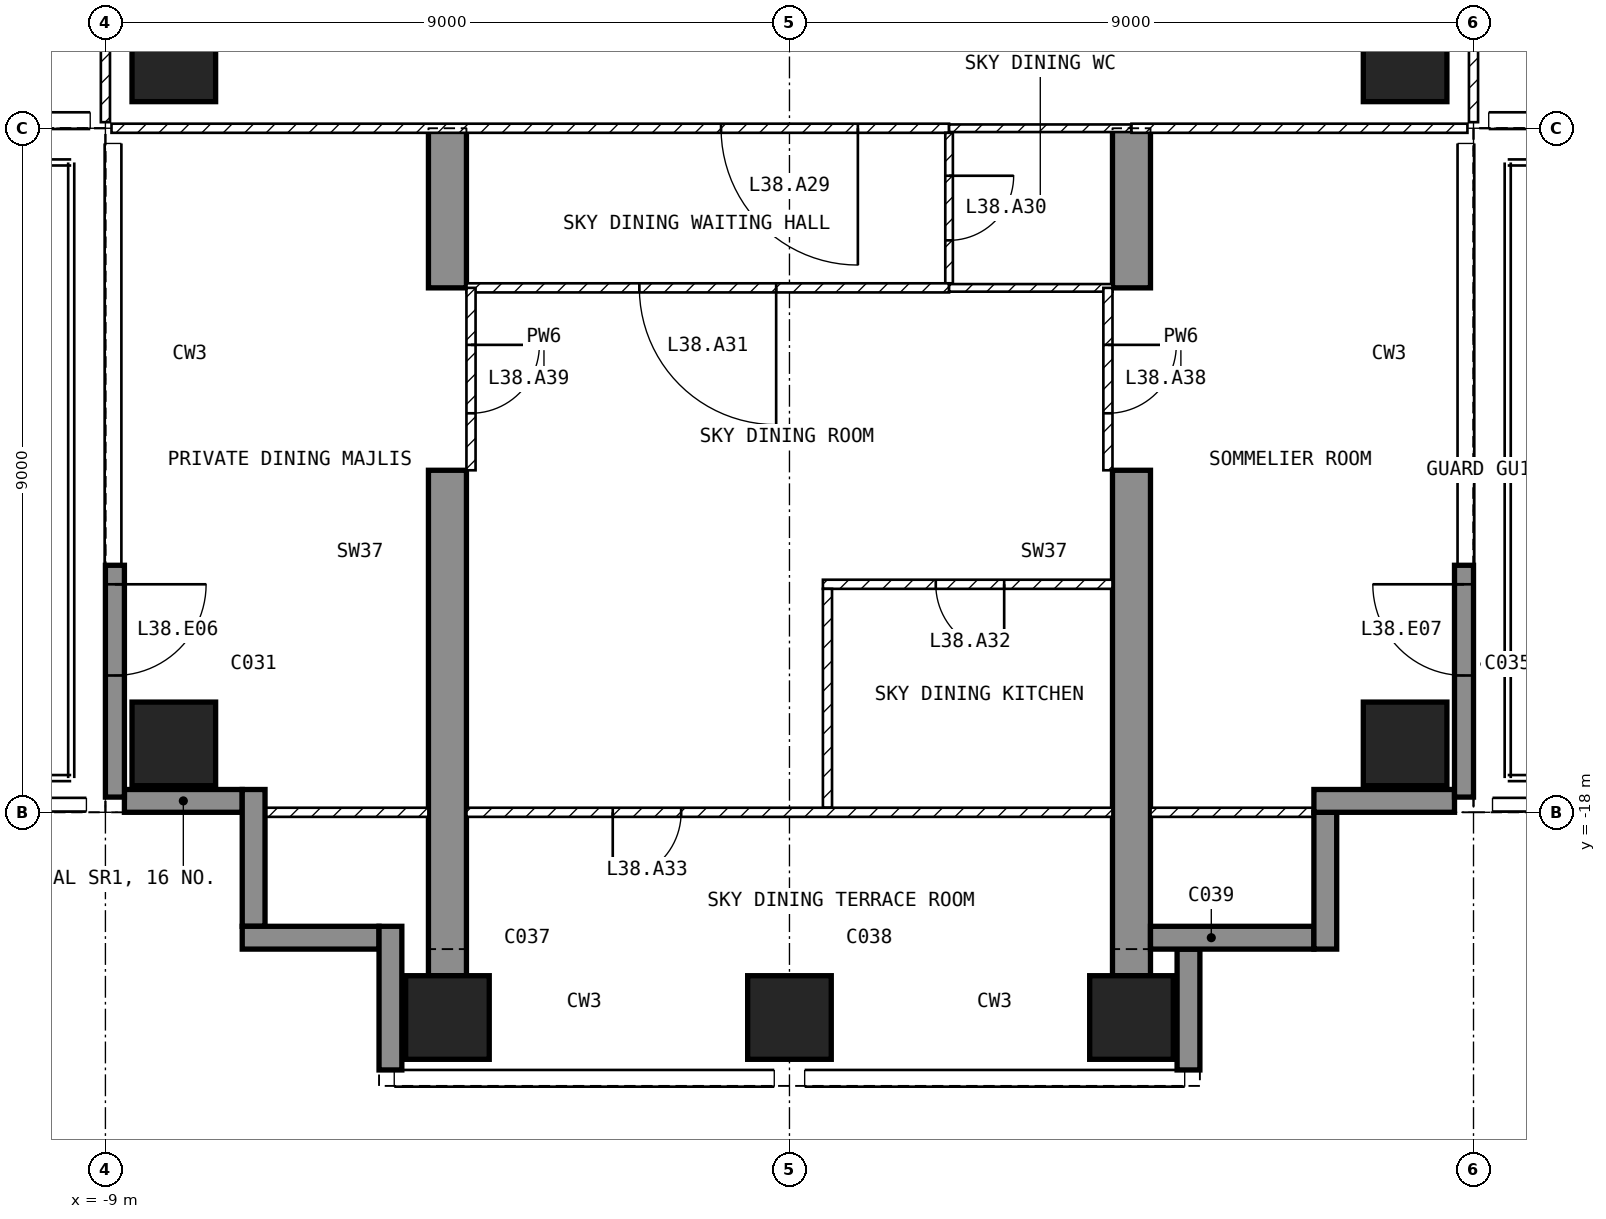
"""IFC4 building model, lengths in metres.
Left out: names, types, materials, properties, quantities, classifications, styles, units other than length and angle.
Written with IfcOpenShell. Run it as: python <this file> out.ifc"""

import sys

from ifc_helpers import new_model, si_unit, direction, frame, frame_2d, origin, origin_2d, place, context, subcontext, project, spatial, polyline, rectangle, outline, extrude, element, fill, save


model = new_model("IFC4")
c1 = context("Model", 3, precision=1e-05, world=origin(), true_north=direction((0.0, 1.0)))
c2 = subcontext(c1, "Body", "Model", "MODEL_VIEW")
j1 = project(units=[si_unit("LENGTHUNIT", "METRE"), si_unit("PLANEANGLEUNIT", "RADIAN")], contexts=[c1])
p1 = place(None, origin())
s1 = spatial("IfcSite", under=j1, at=p1, CompositionType="ELEMENT")
p2 = place(p1, origin())
s2 = spatial("IfcBuilding", under=s1, at=p2, CompositionType="ELEMENT")
p3 = place(p2, frame((0.0, 0.0, 154.9)))
s3 = spatial("IfcBuildingStorey", under=s2, at=p3, CompositionType="ELEMENT", Elevation=154.9)
for number, where, z_axis, x_axis in (
    (1, (-8.1, -17.1, -0.3), (0.0, 0.0, 1.0), (1.0, 0.0, 0.0)),
    (2, (-8.1, -8.1, -0.3), (0.0, 0.0, 1.0), (1.0, 0.0, 0.0)),
    (3, (-4.5, -20.7, -0.3), (0.0, 0.0, 1.0), (1.0, 0.0, 0.0)),
    (4, (0.0, -20.7, -0.3), (0.0, 0.0, 1.0), (1.0, 0.0, 0.0)),
    (5, (4.5, -20.7, -0.3), (0.0, 0.0, 1.0), (1.0, 0.0, 0.0)),
    (6, (8.1, -17.1, -0.3), (0.0, 0.0, 1.0), (1.0, 0.0, 0.0)),
    (7, (8.1, -8.1, -0.3), (0.0, 0.0, 1.0), (1.0, 0.0, 0.0)),
):
    element("IfcColumn", number, at=place(p3, frame(where, z_axis=z_axis, x_axis=x_axis)), inside=s3, PredefinedType="COLUMN", context=c2, shape_type="SweptSolid", body=[
        extrude(rectangle(XDim=1.1, YDim=1.1, at=origin_2d()), origin(), (0.0, 0.0, 1.0), 7.05),
    ])
for number, where, z_axis, x_axis in (
    (8, (-4.75, -20.15, -0.3), (1.0, 0.0, 0.0), (0.0, 1.0, 0.0)),
    (9, (4.25, -20.15, -0.3), (1.0, 0.0, 0.0), (0.0, 1.0, 0.0)),
):
    element("IfcWall", number, at=place(p3, frame(where, z_axis=z_axis, x_axis=x_axis)), inside=s3, PredefinedType="SHEAR", context=c2, shape_type="SweptSolid", body=[
        extrude(outline(polyline([(0.0, 0.0), (6.65, 0.0), (6.65, 2.7), (9.05, 2.7), (9.05, 0.0), (11.15, 0.0), (11.15, 7.05), (0.0, 7.05), (0.0, 0.0)])), origin(), (0.0, 0.0, 1.0), 0.5),
    ])
p4 = place(p3, frame((-8.875, -14.75, 0.0), z_axis=(0.0, 0.0, 1.0), x_axis=(0.0, -1.0, 0.0)))
e10 = element("IfcWall", 10, at=p4, inside=s3, PredefinedType="SOLIDWALL", context=c2, shape_type="SweptSolid", body=[
    extrude(rectangle(XDim=3.05, YDim=0.25, at=frame_2d((1.525, 0.0))), origin(), (0.0, 0.0, 1.0), 6.75),
])
p5 = place(p4, frame((0.25, 0.0, 0.0)))
e11 = element("IfcOpeningElement", 11, at=p5, cuts=e10, PredefinedType="OPENING", context=c2, shape_type="SweptSolid", body=[
    extrude(rectangle(XDim=1.2, YDim=2.4, at=frame_2d((0.6, 1.2))), frame((0.0, 0.135, 0.0), z_axis=(0.0, -1.0, 0.0), x_axis=(1.0, 0.0, 0.0)), (0.0, 0.0, 1.0), 0.27),
])
p6 = place(p3, frame((8.875, -17.8, 0.0), z_axis=(0.0, 0.0, 1.0), x_axis=(0.0, 1.0, 0.0)))
e12 = element("IfcWall", 12, at=p6, inside=s3, PredefinedType="SOLIDWALL", context=c2, shape_type="SweptSolid", body=[
    extrude(rectangle(XDim=3.05, YDim=0.25, at=frame_2d((1.525, 0.0))), origin(), (0.0, 0.0, 1.0), 6.75),
])
p7 = place(p6, frame((1.6, 0.0, 0.0)))
e13 = element("IfcOpeningElement", 13, at=p7, cuts=e12, PredefinedType="OPENING", context=c2, shape_type="SweptSolid", body=[
    extrude(rectangle(XDim=1.2, YDim=2.4, at=frame_2d((0.6, 1.2))), frame((0.0, 0.135, 0.0), z_axis=(0.0, -1.0, 0.0), x_axis=(1.0, 0.0, 0.0)), (0.0, 0.0, 1.0), 0.27),
])
p8 = place(p3, frame((5.25, -21.39, 0.0), z_axis=(0.0, 0.0, 1.0), x_axis=(0.0, 1.0, 0.0)))
e14 = element("IfcWall", 14, at=p8, inside=s3, PredefinedType="SOLIDWALL", context=c2, shape_type="SweptSolid", body=[
    extrude(rectangle(XDim=1.59, YDim=0.3, at=frame_2d((0.795, 0.0))), origin(), (0.0, 0.0, 1.0), 6.75),
])
p9 = place(p3, frame((4.75, -19.65, 0.0), z_axis=(0.0, 0.0, 1.0), x_axis=(1.0, 0.0, 0.0)))
e15 = element("IfcWall", 15, at=p9, inside=s3, PredefinedType="SOLIDWALL", context=c2, shape_type="SweptSolid", body=[
    extrude(rectangle(XDim=2.15, YDim=0.3, at=frame_2d((1.075, 0.0))), origin(), (0.0, 0.0, 1.0), 6.75),
])
p10 = place(p3, frame((7.05, -19.8, 0.0), z_axis=(0.0, 0.0, 1.0), x_axis=(0.0, 1.0, 0.0)))
e16 = element("IfcWall", 16, at=p10, inside=s3, PredefinedType="SOLIDWALL", context=c2, shape_type="SweptSolid", body=[
    extrude(rectangle(XDim=1.8, YDim=0.3, at=frame_2d((0.9, 0.0))), origin(), (0.0, 0.0, 1.0), 6.75),
])
p11 = place(p3, frame((6.9, -17.85, 0.0), z_axis=(0.0, 0.0, 1.0), x_axis=(1.0, 0.0, 0.0)))
e17 = element("IfcWall", 17, at=p11, inside=s3, PredefinedType="SOLIDWALL", context=c2, shape_type="SweptSolid", body=[
    extrude(rectangle(XDim=1.85, YDim=0.3, at=frame_2d((0.925, 0.0))), origin(), (0.0, 0.0, 1.0), 6.75),
])
p12 = place(p3, frame((-8.75, -17.85, 0.0), z_axis=(0.0, 0.0, 1.0), x_axis=(1.0, 0.0, 0.0)))
e18 = element("IfcWall", 18, at=p12, inside=s3, PredefinedType="SOLIDWALL", context=c2, shape_type="SweptSolid", body=[
    extrude(rectangle(XDim=1.55, YDim=0.3, at=frame_2d((0.775, 0.0))), origin(), (0.0, 0.0, 1.0), 6.75),
])
for number, where, z_axis, x_axis in (
    (19, (-7.05, -17.7, 0.0), (0.0, 0.0, 1.0), (0.0, -1.0, 0.0)),
    (20, (-7.2, -19.65, 0.0), (0.0, 0.0, 1.0), (1.0, 0.0, 0.0)),
):
    element("IfcWall", number, at=place(p3, frame(where, z_axis=z_axis, x_axis=x_axis)), inside=s3, PredefinedType="SOLIDWALL", context=c2, shape_type="SweptSolid", body=[
        extrude(rectangle(XDim=1.8, YDim=0.3, at=frame_2d((0.9, 0.0))), origin(), (0.0, 0.0, 1.0), 6.75),
    ])
p13 = place(p3, frame((-5.25, -19.5, 0.0), z_axis=(0.0, 0.0, 1.0), x_axis=(0.0, -1.0, 0.0)))
e21 = element("IfcWall", 21, at=p13, inside=s3, PredefinedType="SOLIDWALL", context=c2, shape_type="SweptSolid", body=[
    extrude(rectangle(XDim=1.89, YDim=0.3, at=frame_2d((0.945, 0.0))), origin(), (0.0, 0.0, 1.0), 6.75),
])
for number, where, z_axis, x_axis in (
    (22, (9.0, -1.26, 0.0), (0.0, 0.0, 1.0), (0.0, -1.0, 0.0)),
    (23, (-9.0, -8.92, 0.0), (0.0, 0.0, 1.0), (0.0, 1.0, 0.0)),
):
    element("IfcWall", number, at=place(p3, frame(where, z_axis=z_axis, x_axis=x_axis)), inside=s3, PredefinedType="PARTITIONING", context=c2, shape_type="SweptSolid", body=[
        extrude(rectangle(XDim=7.66, YDim=0.12, at=frame_2d((3.83, 0.0))), origin(), (0.0, 0.0, 1.0), 6.75),
    ])
p14 = place(p3, frame((2.1, -9.0, 0.0), z_axis=(0.0, 0.0, 1.0), x_axis=(-1.0, 0.0, 0.0)))
e24 = element("IfcWall", 24, at=p14, inside=s3, PredefinedType="PARTITIONING", context=c2, shape_type="SweptSolid", body=[
    extrude(rectangle(XDim=11.02, YDim=0.12, at=frame_2d((5.51, 0.0))), origin(), (0.0, 0.0, 1.0), 6.75),
])
p15 = place(p14, frame((1.2, 0.0, 0.0)))
e25 = element("IfcOpeningElement", 25, at=p15, cuts=e24, PredefinedType="OPENING", context=c2, shape_type="SweptSolid", body=[
    extrude(rectangle(XDim=1.8, YDim=2.1, at=frame_2d((0.9, 1.05))), frame((0.0, 0.07, 0.0), z_axis=(0.0, -1.0, 0.0), x_axis=(1.0, 0.0, 0.0)), (0.0, 0.0, 1.0), 0.14),
])
p16 = place(p3, frame((4.5, -9.0, 0.0), z_axis=(0.0, 0.0, 1.0), x_axis=(-1.0, 0.0, 0.0)))
e26 = element("IfcWall", 26, at=p16, inside=s3, PredefinedType="PARTITIONING", context=c2, shape_type="SweptSolid", body=[
    extrude(rectangle(XDim=2.4, YDim=0.1, at=frame_2d((1.2, 0.0))), origin(), (0.0, 0.0, 1.0), 6.75),
])
p17 = place(p3, frame((8.92, -9.0, 0.0), z_axis=(0.0, 0.0, 1.0), x_axis=(-1.0, 0.0, 0.0)))
e27 = element("IfcWall", 27, at=p17, inside=s3, PredefinedType="PARTITIONING", context=c2, shape_type="SweptSolid", body=[
    extrude(rectangle(XDim=4.42, YDim=0.12, at=frame_2d((2.21, 0.0))), origin(), (0.0, 0.0, 1.0), 6.75),
])
p18 = place(p3, frame((2.1, -9.06, 0.0), z_axis=(0.0, 0.0, 1.0), x_axis=(0.0, -1.0, 0.0)))
e28 = element("IfcWall", 28, at=p18, inside=s3, PredefinedType="PARTITIONING", context=c2, shape_type="SweptSolid", body=[
    extrude(rectangle(XDim=1.98, YDim=0.1, at=frame_2d((0.99, 0.0))), origin(), (0.0, 0.0, 1.0), 6.75),
])
p19 = place(p18, frame((0.565, 0.0, 0.0)))
e29 = element("IfcOpeningElement", 29, at=p19, cuts=e28, PredefinedType="OPENING", context=c2, shape_type="SweptSolid", body=[
    extrude(rectangle(XDim=0.85, YDim=2.1, at=frame_2d((0.425, 1.05))), frame((0.0, 0.06, 0.0), z_axis=(0.0, -1.0, 0.0), x_axis=(1.0, 0.0, 0.0)), (0.0, 0.0, 1.0), 0.12),
])
p20 = place(p3, frame((2.1, -11.1, 0.0), z_axis=(0.0, 0.0, 1.0), x_axis=(-1.0, 0.0, 0.0)))
e30 = element("IfcWall", 30, at=p20, inside=s3, PredefinedType="PARTITIONING", context=c2, shape_type="SweptSolid", body=[
    extrude(rectangle(XDim=6.35, YDim=0.12, at=frame_2d((3.175, 0.0))), origin(), (0.0, 0.0, 1.0), 6.75),
])
p21 = place(p20, frame((2.275, 0.0, 0.0)))
e31 = element("IfcOpeningElement", 31, at=p21, cuts=e30, PredefinedType="OPENING", context=c2, shape_type="SweptSolid", body=[
    extrude(rectangle(XDim=1.8, YDim=2.1, at=frame_2d((0.9, 1.05))), frame((0.0, 0.07, 0.0), z_axis=(0.0, -1.0, 0.0), x_axis=(1.0, 0.0, 0.0)), (0.0, 0.0, 1.0), 0.14),
])
p22 = place(p3, frame((4.25, -11.1, 0.0), z_axis=(0.0, 0.0, 1.0), x_axis=(-1.0, 0.0, 0.0)))
e32 = element("IfcWall", 32, at=p22, inside=s3, PredefinedType="PARTITIONING", context=c2, shape_type="SweptSolid", body=[
    extrude(rectangle(XDim=2.15, YDim=0.1, at=frame_2d((1.075, 0.0))), origin(), (0.0, 0.0, 1.0), 6.75),
])
p23 = place(p3, frame((4.25, -15.0, 0.0), z_axis=(0.0, 0.0, 1.0), x_axis=(-1.0, 0.0, 0.0)))
e33 = element("IfcWall", 33, at=p23, inside=s3, PredefinedType="PARTITIONING", context=c2, shape_type="SweptSolid", body=[
    extrude(rectangle(XDim=3.81, YDim=0.12, at=frame_2d((1.905, 0.0))), origin(), (0.0, 0.0, 1.0), 6.75),
])
p24 = place(p23, frame((1.425, 0.0, 0.0)))
e34 = element("IfcOpeningElement", 34, at=p24, cuts=e33, PredefinedType="OPENING", context=c2, shape_type="SweptSolid", body=[
    extrude(rectangle(XDim=0.9, YDim=2.1, at=frame_2d((0.45, 1.05))), frame((0.0, 0.07, 0.0), z_axis=(0.0, -1.0, 0.0), x_axis=(1.0, 0.0, 0.0)), (0.0, 0.0, 1.0), 0.14),
])
p25 = place(p3, frame((0.5, -15.06, 0.0), z_axis=(0.0, 0.0, 1.0), x_axis=(0.0, -1.0, 0.0)))
e35 = element("IfcWall", 35, at=p25, inside=s3, PredefinedType="PARTITIONING", context=c2, shape_type="SweptSolid", body=[
    extrude(rectangle(XDim=2.88, YDim=0.12, at=frame_2d((1.44, 0.0))), origin(), (0.0, 0.0, 1.0), 6.75),
])
p26 = place(p3, frame((4.25, -18.0, 0.0), z_axis=(0.0, 0.0, 1.0), x_axis=(-1.0, 0.0, 0.0)))
e36 = element("IfcWall", 36, at=p26, inside=s3, PredefinedType="PARTITIONING", context=c2, shape_type="SweptSolid", body=[
    extrude(rectangle(XDim=8.5, YDim=0.12, at=frame_2d((4.25, 0.0))), origin(), (0.0, 0.0, 1.0), 6.75),
])
p27 = place(p26, frame((5.675, 0.0, 0.0)))
e37 = element("IfcOpeningElement", 37, at=p27, cuts=e36, PredefinedType="OPENING", context=c2, shape_type="SweptSolid", body=[
    extrude(rectangle(XDim=0.9, YDim=2.1, at=frame_2d((0.45, 1.05))), frame((0.0, 0.07, 0.0), z_axis=(0.0, -1.0, 0.0), x_axis=(1.0, 0.0, 0.0)), (0.0, 0.0, 1.0), 0.14),
])
for number, where, z_axis, x_axis in (
    (38, (7.12, -18.0, 0.0), (0.0, 0.0, 1.0), (-1.0, 0.0, 0.0)),
    (39, (-4.75, -18.0, 0.0), (0.0, 0.0, 1.0), (-1.0, 0.0, 0.0)),
):
    element("IfcWall", number, at=place(p3, frame(where, z_axis=z_axis, x_axis=x_axis)), inside=s3, PredefinedType="PARTITIONING", context=c2, shape_type="SweptSolid", body=[
        extrude(rectangle(XDim=2.37, YDim=0.12, at=frame_2d((1.185, 0.0))), origin(), (0.0, 0.0, 1.0), 6.75),
    ])
p28 = place(p3, frame((4.19, -11.1, 0.0), z_axis=(0.0, 0.0, 1.0), x_axis=(0.0, -1.0, 0.0)))
e40 = element("IfcWall", 40, at=p28, inside=s3, PredefinedType="PARTITIONING", context=c2, shape_type="SweptSolid", body=[
    extrude(rectangle(XDim=2.4, YDim=0.12, at=frame_2d((1.2, 0.0))), origin(), (0.0, 0.0, 1.0), 2.4),
])
p29 = place(p28, frame((0.75, 0.0, 0.0)))
e41 = element("IfcOpeningElement", 41, at=p29, cuts=e40, PredefinedType="OPENING", context=c2, shape_type="SweptSolid", body=[
    extrude(rectangle(XDim=0.9, YDim=2.1, at=frame_2d((0.45, 1.05))), frame((0.0, 0.07, 0.0), z_axis=(0.0, -1.0, 0.0), x_axis=(1.0, 0.0, 0.0)), (0.0, 0.0, 1.0), 0.14),
])
p30 = place(p3, frame((-4.19, -11.1, 0.0), z_axis=(0.0, 0.0, 1.0), x_axis=(0.0, -1.0, 0.0)))
e42 = element("IfcWall", 42, at=p30, inside=s3, PredefinedType="PARTITIONING", context=c2, shape_type="SweptSolid", body=[
    extrude(rectangle(XDim=2.4, YDim=0.12, at=frame_2d((1.2, 0.0))), origin(), (0.0, 0.0, 1.0), 2.4),
])
p31 = place(p30, frame((0.75, 0.0, 0.0)))
e43 = element("IfcOpeningElement", 43, at=p31, cuts=e42, PredefinedType="OPENING", context=c2, shape_type="SweptSolid", body=[
    extrude(rectangle(XDim=0.9, YDim=2.1, at=frame_2d((0.45, 1.05))), frame((0.0, 0.07, 0.0), z_axis=(0.0, -1.0, 0.0), x_axis=(1.0, 0.0, 0.0)), (0.0, 0.0, 1.0), 0.14),
])
p32 = place(p5, origin())
e44 = element("IfcDoor", 44, at=p32, inside=s3, OperationType="SINGLE_SWING_LEFT", PredefinedType="DOOR", context=c2, shape_type="SweptSolid", body=[
    extrude(rectangle(XDim=1.2, YDim=2.4, at=frame_2d((0.6, 1.2))), frame((0.0, 0.025, 0.0), z_axis=(0.0, -1.0, 0.0), x_axis=(1.0, 0.0, 0.0)), (0.0, 0.0, 1.0), 0.05),
])
fill(e11, e44)
p33 = place(p7, origin())
e45 = element("IfcDoor", 45, at=p33, inside=s3, OperationType="SINGLE_SWING_RIGHT", PredefinedType="DOOR", context=c2, shape_type="SweptSolid", body=[
    extrude(rectangle(XDim=1.2, YDim=2.4, at=frame_2d((0.6, 1.2))), frame((0.0, 0.025, 0.0), z_axis=(0.0, -1.0, 0.0), x_axis=(1.0, 0.0, 0.0)), (0.0, 0.0, 1.0), 0.05),
])
fill(e13, e45)
p34 = place(p15, origin())
e46 = element("IfcDoor", 46, at=p34, inside=s3, OperationType="SINGLE_SWING_LEFT", PredefinedType="DOOR", context=c2, shape_type="SweptSolid", body=[
    extrude(rectangle(XDim=1.8, YDim=2.1, at=frame_2d((0.9, 1.05))), frame((0.0, 0.025, 0.0), z_axis=(0.0, -1.0, 0.0), x_axis=(1.0, 0.0, 0.0)), (0.0, 0.0, 1.0), 0.05),
])
fill(e25, e46)
p35 = place(p19, origin())
e47 = element("IfcDoor", 47, at=p35, inside=s3, OperationType="SINGLE_SWING_LEFT", PredefinedType="DOOR", context=c2, shape_type="SweptSolid", body=[
    extrude(rectangle(XDim=0.85, YDim=2.1, at=frame_2d((0.425, 1.05))), frame((0.0, 0.025, 0.0), z_axis=(0.0, -1.0, 0.0), x_axis=(1.0, 0.0, 0.0)), (0.0, 0.0, 1.0), 0.05),
])
fill(e29, e47)
p36 = place(p21, origin())
e48 = element("IfcDoor", 48, at=p36, inside=s3, OperationType="SINGLE_SWING_LEFT", PredefinedType="DOOR", context=c2, shape_type="SweptSolid", body=[
    extrude(rectangle(XDim=1.8, YDim=2.1, at=frame_2d((0.9, 1.05))), frame((0.0, 0.025, 0.0), z_axis=(0.0, -1.0, 0.0), x_axis=(1.0, 0.0, 0.0)), (0.0, 0.0, 1.0), 0.05),
])
fill(e31, e48)
p37 = place(p24, origin())
e49 = element("IfcDoor", 49, at=p37, inside=s3, OperationType="SINGLE_SWING_LEFT", PredefinedType="DOOR", context=c2, shape_type="SweptSolid", body=[
    extrude(rectangle(XDim=0.9, YDim=2.1, at=frame_2d((0.45, 1.05))), frame((0.0, 0.025, 0.0), z_axis=(0.0, -1.0, 0.0), x_axis=(1.0, 0.0, 0.0)), (0.0, 0.0, 1.0), 0.05),
])
fill(e34, e49)
p38 = place(p27, origin())
e50 = element("IfcDoor", 50, at=p38, inside=s3, OperationType="SINGLE_SWING_RIGHT", PredefinedType="DOOR", context=c2, shape_type="SweptSolid", body=[
    extrude(rectangle(XDim=0.9, YDim=2.1, at=frame_2d((0.45, 1.05))), frame((0.0, 0.025, 0.0), z_axis=(0.0, -1.0, 0.0), x_axis=(1.0, 0.0, 0.0)), (0.0, 0.0, 1.0), 0.05),
])
fill(e37, e50)
p39 = place(p29, origin())
e51 = element("IfcDoor", 51, at=p39, inside=s3, OperationType="SINGLE_SWING_LEFT", PredefinedType="DOOR", context=c2, shape_type="SweptSolid", body=[
    extrude(rectangle(XDim=0.9, YDim=2.1, at=frame_2d((0.45, 1.05))), frame((0.0, 0.025, 0.0), z_axis=(0.0, -1.0, 0.0), x_axis=(1.0, 0.0, 0.0)), (0.0, 0.0, 1.0), 0.05),
])
fill(e41, e51)
p40 = place(p31, origin())
e52 = element("IfcDoor", 52, at=p40, inside=s3, OperationType="SINGLE_SWING_LEFT", PredefinedType="DOOR", context=c2, shape_type="SweptSolid", body=[
    extrude(rectangle(XDim=0.9, YDim=2.1, at=frame_2d((0.45, 1.05))), frame((0.0, 0.025, 0.0), z_axis=(0.0, -1.0, 0.0), x_axis=(1.0, 0.0, 0.0)), (0.0, 0.0, 1.0), 0.05),
])
fill(e43, e52)
save(model, sys.argv[1])
